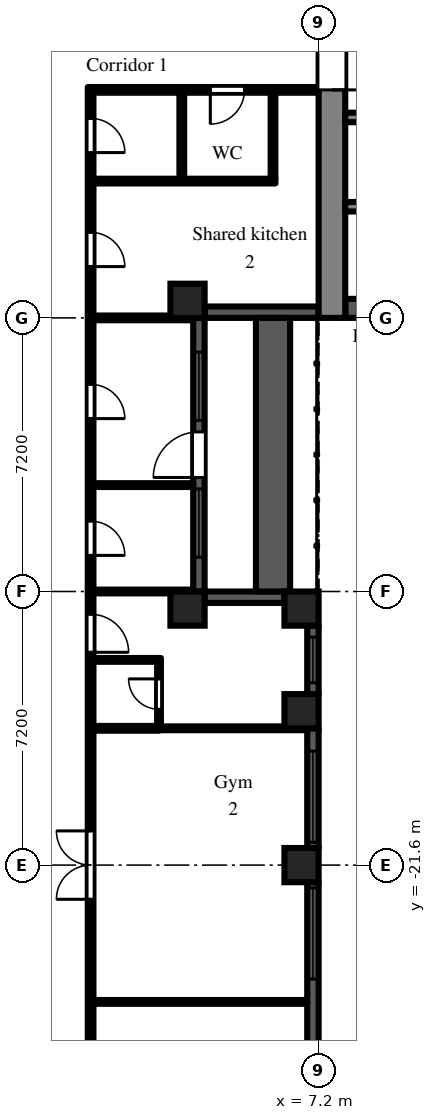
"""IFC4 building model, lengths in metres.
Left out: names, types, materials, properties, quantities, classifications, styles, units other than length and angle.
Written with IfcOpenShell. Run it as: python <this file> out.ifc"""

import sys

from ifc_helpers import new_model, si_unit, direction, frame, frame_2d, origin, origin_2d, place, context, subcontext, project, spatial, rectangle, extrude, element, fill, save


model = new_model("IFC4")
c1 = context("Model", 3, precision=1e-05, world=origin(), true_north=direction((0.0, 1.0)))
c2 = subcontext(c1, "Body", "Model", "MODEL_VIEW")
j1 = project(units=[si_unit("LENGTHUNIT", "METRE"), si_unit("PLANEANGLEUNIT", "RADIAN")], contexts=[c1])
p1 = place(None, origin())
s1 = spatial("IfcSite", under=j1, at=p1, CompositionType="ELEMENT")
p2 = place(p1, origin())
s2 = spatial("IfcBuilding", under=s1, at=p2, CompositionType="ELEMENT")
p3 = place(p2, frame((0.0, 0.0, 75.9)))
s3 = spatial("IfcBuildingStorey", under=s2, at=p3, CompositionType="ELEMENT", Elevation=75.9)
for number, where, z_axis, x_axis in (
    (1, (3.75, -14.85, 0.0), (0.0, 0.0, 1.0), (1.0, 0.0, 0.0)),
    (2, (3.75, -6.75, 0.0), (0.0, 0.0, 1.0), (1.0, 0.0, 0.0)),
    (3, (6.75, -21.6, 0.0), (0.0, 0.0, 1.0), (1.0, 0.0, 0.0)),
    (4, (6.75, -17.55, 0.0), (0.0, 0.0, 1.0), (1.0, 0.0, 0.0)),
    (5, (6.75, -14.85, 0.0), (0.0, 0.0, 1.0), (1.0, 0.0, 0.0)),
):
    element("IfcColumn", number, at=place(p3, frame(where, z_axis=z_axis, x_axis=x_axis)), inside=s3, PredefinedType="COLUMN", context=c2, shape_type="SweptSolid", body=[
        extrude(rectangle(XDim=0.9, YDim=0.9, at=origin_2d()), origin(), (0.0, 0.0, 1.0), 3.0),
    ])
p4 = place(p3, frame((7.05, -28.35, 0.0), z_axis=(0.0, 0.0, 1.0), x_axis=(0.0, 1.0, 0.0)))
e6 = element("IfcWall", 6, at=p4, inside=s3, PredefinedType="SOLIDWALL", context=c2, shape_type="SweptSolid", body=[
    extrude(rectangle(XDim=6.3, YDim=0.3, at=frame_2d((3.15, 0.0))), origin(), (0.0, 0.0, 1.0), 2.1),
])
p5 = place(p4, frame((3.75, 0.0, 0.2)))
e7 = element("IfcOpeningElement", 7, at=p5, cuts=e6, PredefinedType="OPENING", context=c2, shape_type="SweptSolid", body=[
    extrude(rectangle(XDim=2.4, YDim=1.85, at=frame_2d((1.2, 0.925))), frame((0.0, 0.16, 0.0), z_axis=(0.0, -1.0, 0.0), x_axis=(1.0, 0.0, 0.0)), (0.0, 0.0, 1.0), 0.32),
])
p6 = place(p3, frame((7.05, -21.15, 0.0), z_axis=(0.0, 0.0, 1.0), x_axis=(0.0, 1.0, 0.0)))
e8 = element("IfcWall", 8, at=p6, inside=s3, PredefinedType="SOLIDWALL", context=c2, shape_type="SweptSolid", body=[
    extrude(rectangle(XDim=3.15, YDim=0.3, at=frame_2d((1.575, 0.0))), origin(), (0.0, 0.0, 1.0), 2.1),
])
p7 = place(p6, frame((0.15, 0.0, 0.2)))
e9 = element("IfcOpeningElement", 9, at=p7, cuts=e8, PredefinedType="OPENING", context=c2, shape_type="SweptSolid", body=[
    extrude(rectangle(XDim=2.4, YDim=1.85, at=frame_2d((1.2, 0.925))), frame((0.0, 0.16, 0.0), z_axis=(0.0, -1.0, 0.0), x_axis=(1.0, 0.0, 0.0)), (0.0, 0.0, 1.0), 0.32),
])
p8 = place(p3, frame((7.05, -17.1, 0.0), z_axis=(0.0, 0.0, 1.0), x_axis=(0.0, 1.0, 0.0)))
e10 = element("IfcWall", 10, at=p8, inside=s3, PredefinedType="SOLIDWALL", context=c2, shape_type="SweptSolid", body=[
    extrude(rectangle(XDim=1.8, YDim=0.3, at=frame_2d((0.9, 0.0))), origin(), (0.0, 0.0, 1.0), 2.1),
])
p9 = place(p8, frame((0.3, 0.0, 0.2)))
e11 = element("IfcOpeningElement", 11, at=p9, cuts=e10, PredefinedType="OPENING", context=c2, shape_type="SweptSolid", body=[
    extrude(rectangle(XDim=1.2, YDim=1.85, at=frame_2d((0.6, 0.925))), frame((0.0, 0.16, 0.0), z_axis=(0.0, -1.0, 0.0), x_axis=(1.0, 0.0, 0.0)), (0.0, 0.0, 1.0), 0.32),
])
p10 = place(p3, frame((6.3, -14.55, 0.0), z_axis=(0.0, 0.0, 1.0), x_axis=(-1.0, 0.0, 0.0)))
e12 = element("IfcWall", 12, at=p10, inside=s3, PredefinedType="SOLIDWALL", context=c2, shape_type="SweptSolid", body=[
    extrude(rectangle(XDim=2.1, YDim=0.3, at=frame_2d((1.05, 0.0))), origin(), (0.0, 0.0, 1.0), 2.1),
])
p11 = place(p3, frame((4.05, -14.4, 0.0), z_axis=(0.0, 0.0, 1.0), x_axis=(0.0, 1.0, 0.0)))
e13 = element("IfcWall", 13, at=p11, inside=s3, PredefinedType="SOLIDWALL", context=c2, shape_type="SweptSolid", body=[
    extrude(rectangle(XDim=7.2, YDim=0.3, at=frame_2d((3.6, 0.0))), origin(), (0.0, 0.0, 1.0), 2.1),
])
p12 = place(p11, frame((3.0, 0.0, 0.0)))
e14 = element("IfcOpeningElement", 14, at=p12, cuts=e13, PredefinedType="OPENING", context=c2, shape_type="SweptSolid", body=[
    extrude(rectangle(XDim=1.2, YDim=2.05, at=frame_2d((0.6, 1.025))), frame((0.0, 0.16, 0.0), z_axis=(0.0, -1.0, 0.0), x_axis=(1.0, 0.0, 0.0)), (0.0, 0.0, 1.0), 0.32),
])
p13 = place(p11, frame((0.9, 0.0, 0.2)))
e15 = element("IfcOpeningElement", 15, at=p13, cuts=e13, PredefinedType="OPENING", context=c2, shape_type="SweptSolid", body=[
    extrude(rectangle(XDim=1.8, YDim=1.85, at=frame_2d((0.9, 0.925))), frame((0.0, 0.16, 0.0), z_axis=(0.0, -1.0, 0.0), x_axis=(1.0, 0.0, 0.0)), (0.0, 0.0, 1.0), 0.32),
])
p14 = place(p11, frame((4.5, 0.0, 0.2)))
e16 = element("IfcOpeningElement", 16, at=p14, cuts=e13, PredefinedType="OPENING", context=c2, shape_type="SweptSolid", body=[
    extrude(rectangle(XDim=1.8, YDim=1.85, at=frame_2d((0.9, 0.925))), frame((0.0, 0.16, 0.0), z_axis=(0.0, -1.0, 0.0), x_axis=(1.0, 0.0, 0.0)), (0.0, 0.0, 1.0), 0.32),
])
p15 = place(p3, frame((4.2, -7.05, 0.0), z_axis=(0.0, 0.0, 1.0), x_axis=(1.0, 0.0, 0.0)))
e17 = element("IfcWall", 17, at=p15, inside=s3, PredefinedType="SOLIDWALL", context=c2, shape_type="SweptSolid", body=[
    extrude(rectangle(XDim=3.0, YDim=0.3, at=frame_2d((1.5, 0.0))), origin(), (0.0, 0.0, 1.0), 2.1),
])
p16 = place(p3, frame((6.0, -14.4, 0.0), z_axis=(0.0, 0.0, 1.0), x_axis=(0.0, 1.0, 0.0)))
e18 = element("IfcWall", 18, at=p16, inside=s3, PredefinedType="PARAPET", context=c2, shape_type="SweptSolid", body=[
    extrude(rectangle(XDim=7.2, YDim=0.9, at=frame_2d((3.6, 0.0))), origin(), (0.0, 0.0, 1.0), 0.8),
])
p17 = place(p3, frame((7.55, -7.2, 0.0), z_axis=(0.0, 0.0, 1.0), x_axis=(0.0, 1.0, 0.0)))
e19 = element("IfcWall", 19, at=p17, inside=s3, PredefinedType="SHEAR", context=c2, shape_type="SweptSolid", body=[
    extrude(rectangle(XDim=14.4, YDim=0.7, at=frame_2d((7.2, 0.0))), origin(), (0.0, 0.0, 1.0), 2.575),
])
p18 = place(p17, frame((6.0, 0.0, 0.0)))
e20 = element("IfcOpeningElement", 20, at=p18, cuts=e19, PredefinedType="OPENING", context=c2, shape_type="SweptSolid", body=[
    extrude(rectangle(XDim=2.4, YDim=2.2, at=frame_2d((1.2, 1.1))), frame((0.0, 0.36, 0.0), z_axis=(0.0, -1.0, 0.0), x_axis=(1.0, 0.0, 0.0)), (0.0, 0.0, 1.0), 0.72),
])
p19 = place(p3, frame((7.9, -6.95, 0.0), z_axis=(0.0, 0.0, 1.0), x_axis=(1.0, 0.0, 0.0)))
e21 = element("IfcWall", 21, at=p19, inside=s3, PredefinedType="SHEAR", context=c2, shape_type="SweptSolid", body=[
    extrude(rectangle(XDim=12.95, YDim=0.5, at=frame_2d((6.475, 0.0))), origin(), (0.0, 0.0, 1.0), 2.575),
])
p20 = place(p3, frame((7.9, -1.925, 0.0), z_axis=(0.0, 0.0, 1.0), x_axis=(1.0, 0.0, 0.0)))
e22 = element("IfcWall", 22, at=p20, inside=s3, PredefinedType="SHEAR", context=c2, shape_type="SweptSolid", body=[
    extrude(rectangle(XDim=12.95, YDim=0.25, at=frame_2d((6.475, 0.0))), origin(), (0.0, 0.0, 1.0), 2.575),
])
p21 = place(p20, frame((4.825, 0.0, 0.0)))
e23 = element("IfcOpeningElement", 23, at=p21, cuts=e22, PredefinedType="OPENING", context=c2, shape_type="SweptSolid", body=[
    extrude(rectangle(XDim=1.1, YDim=2.1, at=frame_2d((0.55, 1.05))), frame((0.0, 0.135, 0.0), z_axis=(0.0, -1.0, 0.0), x_axis=(1.0, 0.0, 0.0)), (0.0, 0.0, 1.0), 0.27),
])
p22 = place(p20, frame((7.025, 0.0, 0.0)))
e24 = element("IfcOpeningElement", 24, at=p22, cuts=e22, PredefinedType="OPENING", context=c2, shape_type="SweptSolid", body=[
    extrude(rectangle(XDim=1.1, YDim=2.1, at=frame_2d((0.55, 1.05))), frame((0.0, 0.135, 0.0), z_axis=(0.0, -1.0, 0.0), x_axis=(1.0, 0.0, 0.0)), (0.0, 0.0, 1.0), 0.27),
])
p23 = place(p20, frame((9.225, 0.0, 0.0)))
e25 = element("IfcOpeningElement", 25, at=p23, cuts=e22, PredefinedType="OPENING", context=c2, shape_type="SweptSolid", body=[
    extrude(rectangle(XDim=1.1, YDim=2.1, at=frame_2d((0.55, 1.05))), frame((0.0, 0.135, 0.0), z_axis=(0.0, -1.0, 0.0), x_axis=(1.0, 0.0, 0.0)), (0.0, 0.0, 1.0), 0.27),
])
p24 = place(p20, frame((0.525, 0.0, 0.0)))
e26 = element("IfcOpeningElement", 26, at=p24, cuts=e22, PredefinedType="OPENING", context=c2, shape_type="SweptSolid", body=[
    extrude(rectangle(XDim=0.9, YDim=2.1, at=frame_2d((0.45, 1.05))), frame((0.0, 0.135, 0.0), z_axis=(0.0, -1.0, 0.0), x_axis=(1.0, 0.0, 0.0)), (0.0, 0.0, 1.0), 0.27),
])
p25 = place(p20, frame((2.625, 0.0, 0.0)))
e27 = element("IfcOpeningElement", 27, at=p25, cuts=e22, PredefinedType="OPENING", context=c2, shape_type="SweptSolid", body=[
    extrude(rectangle(XDim=1.1, YDim=2.1, at=frame_2d((0.55, 1.05))), frame((0.0, 0.135, 0.0), z_axis=(0.0, -1.0, 0.0), x_axis=(1.0, 0.0, 0.0)), (0.0, 0.0, 1.0), 0.27),
])
p26 = place(p3, frame((7.9, -4.275, 0.0), z_axis=(0.0, 0.0, 1.0), x_axis=(1.0, 0.0, 0.0)))
e28 = element("IfcWall", 28, at=p26, inside=s3, PredefinedType="SHEAR", context=c2, shape_type="SweptSolid", body=[
    extrude(rectangle(XDim=1.95, YDim=0.25, at=frame_2d((0.975, 0.0))), origin(), (0.0, 0.0, 1.0), 2.575),
])
p27 = place(p3, frame((1.2, -36.5, 0.0), z_axis=(0.0, 0.0, 1.0), x_axis=(0.0, 1.0, 0.0)))
e29 = element("IfcWall", 29, at=p27, inside=s3, PredefinedType="PARTITIONING", context=c2, shape_type="SweptSolid", body=[
    extrude(rectangle(XDim=35.375, YDim=0.15, at=frame_2d((17.688, 0.0))), origin(), (0.0, 0.0, 1.0), 2.575),
])
p28 = place(p27, frame((33.65, 0.0, 0.0)))
e30 = element("IfcOpeningElement", 30, at=p28, cuts=e29, PredefinedType="OPENING", context=c2, shape_type="SweptSolid", body=[
    extrude(rectangle(XDim=0.9, YDim=2.1, at=frame_2d((0.45, 1.05))), frame((0.0, 0.085, 0.0), z_axis=(0.0, -1.0, 0.0), x_axis=(1.0, 0.0, 0.0)), (0.0, 0.0, 1.0), 0.17),
])
p29 = place(p27, frame((30.65, 0.0, 0.0)))
e31 = element("IfcOpeningElement", 31, at=p29, cuts=e29, PredefinedType="OPENING", context=c2, shape_type="SweptSolid", body=[
    extrude(rectangle(XDim=0.9, YDim=2.1, at=frame_2d((0.45, 1.05))), frame((0.0, 0.085, 0.0), z_axis=(0.0, -1.0, 0.0), x_axis=(1.0, 0.0, 0.0)), (0.0, 0.0, 1.0), 0.17),
])
p30 = place(p27, frame((23.05, 0.0, 0.0)))
e32 = element("IfcOpeningElement", 32, at=p30, cuts=e29, PredefinedType="OPENING", context=c2, shape_type="SweptSolid", body=[
    extrude(rectangle(XDim=0.9, YDim=2.1, at=frame_2d((0.45, 1.05))), frame((0.0, 0.085, 0.0), z_axis=(0.0, -1.0, 0.0), x_axis=(1.0, 0.0, 0.0)), (0.0, 0.0, 1.0), 0.17),
])
p31 = place(p27, frame((26.65, 0.0, 0.0)))
e33 = element("IfcOpeningElement", 33, at=p31, cuts=e29, PredefinedType="OPENING", context=c2, shape_type="SweptSolid", body=[
    extrude(rectangle(XDim=0.9, YDim=2.1, at=frame_2d((0.45, 1.05))), frame((0.0, 0.085, 0.0), z_axis=(0.0, -1.0, 0.0), x_axis=(1.0, 0.0, 0.0)), (0.0, 0.0, 1.0), 0.17),
])
p32 = place(p27, frame((20.5, 0.0, 0.0)))
e34 = element("IfcOpeningElement", 34, at=p32, cuts=e29, PredefinedType="OPENING", context=c2, shape_type="SweptSolid", body=[
    extrude(rectangle(XDim=1.0, YDim=2.1, at=frame_2d((0.5, 1.05))), frame((0.0, 0.085, 0.0), z_axis=(0.0, -1.0, 0.0), x_axis=(1.0, 0.0, 0.0)), (0.0, 0.0, 1.0), 0.17),
])
p33 = place(p27, frame((14.0, 0.0, 0.0)))
e35 = element("IfcOpeningElement", 35, at=p33, cuts=e29, PredefinedType="OPENING", context=c2, shape_type="SweptSolid", body=[
    extrude(rectangle(XDim=1.8, YDim=2.1, at=frame_2d((0.9, 1.05))), frame((0.0, 0.085, 0.0), z_axis=(0.0, -1.0, 0.0), x_axis=(1.0, 0.0, 0.0)), (0.0, 0.0, 1.0), 0.17),
])
p34 = place(p27, frame((6.8, 0.0, 0.0)))
e36 = element("IfcOpeningElement", 36, at=p34, cuts=e29, PredefinedType="OPENING", context=c2, shape_type="SweptSolid", body=[
    extrude(rectangle(XDim=1.8, YDim=2.1, at=frame_2d((0.9, 1.05))), frame((0.0, 0.085, 0.0), z_axis=(0.0, -1.0, 0.0), x_axis=(1.0, 0.0, 0.0)), (0.0, 0.0, 1.0), 0.17),
])
p35 = place(p27, frame((1.15, 0.0, 0.0)))
e37 = element("IfcOpeningElement", 37, at=p35, cuts=e29, PredefinedType="OPENING", context=c2, shape_type="SweptSolid", body=[
    extrude(rectangle(XDim=1.8, YDim=2.1, at=frame_2d((0.9, 1.05))), frame((0.0, 0.085, 0.0), z_axis=(0.0, -1.0, 0.0), x_axis=(1.0, 0.0, 0.0)), (0.0, 0.0, 1.0), 0.17),
])
p36 = place(p3, frame((1.275, -25.2, 0.0), z_axis=(0.0, 0.0, 1.0), x_axis=(1.0, 0.0, 0.0)))
e38 = element("IfcWall", 38, at=p36, inside=s3, PredefinedType="PARTITIONING", context=c2, shape_type="SweptSolid", body=[
    extrude(rectangle(XDim=5.625, YDim=0.1, at=frame_2d((2.812, 0.0))), origin(), (0.0, 0.0, 1.0), 2.575),
])
p37 = place(p3, frame((1.275, -18.0, 0.0), z_axis=(0.0, 0.0, 1.0), x_axis=(1.0, 0.0, 0.0)))
e39 = element("IfcWall", 39, at=p37, inside=s3, PredefinedType="PARTITIONING", context=c2, shape_type="SweptSolid", body=[
    extrude(rectangle(XDim=1.725, YDim=0.125, at=frame_2d((0.863, 0.0))), origin(), (0.0, 0.0, 1.0), 2.575),
])
p38 = place(p3, frame((1.275, -16.2, 0.0), z_axis=(0.0, 0.0, 1.0), x_axis=(1.0, 0.0, 0.0)))
e40 = element("IfcWall", 40, at=p38, inside=s3, PredefinedType="PARTITIONING", context=c2, shape_type="SweptSolid", body=[
    extrude(rectangle(XDim=1.775, YDim=0.1, at=frame_2d((0.888, 0.0))), origin(), (0.0, 0.0, 1.0), 2.575),
])
for number, where, z_axis, x_axis in (
    (41, (1.275, -14.4, 0.0), (0.0, 0.0, 1.0), (1.0, 0.0, 0.0)),
    (42, (1.275, -11.6, 0.0), (0.0, 0.0, 1.0), (1.0, 0.0, 0.0)),
):
    element("IfcWall", number, at=place(p3, frame(where, z_axis=z_axis, x_axis=x_axis)), inside=s3, PredefinedType="PARTITIONING", context=c2, shape_type="SweptSolid", body=[
        extrude(rectangle(XDim=2.625, YDim=0.1, at=frame_2d((1.312, 0.0))), origin(), (0.0, 0.0, 1.0), 2.575),
    ])
p39 = place(p3, frame((1.275, -7.2, 0.0), z_axis=(0.0, 0.0, 1.0), x_axis=(1.0, 0.0, 0.0)))
e43 = element("IfcWall", 43, at=p39, inside=s3, PredefinedType="PARTITIONING", context=c2, shape_type="SweptSolid", body=[
    extrude(rectangle(XDim=2.625, YDim=0.125, at=frame_2d((1.312, 0.0))), origin(), (0.0, 0.0, 1.0), 2.575),
])
p40 = place(p3, frame((1.275, -3.6, 0.0), z_axis=(0.0, 0.0, 1.0), x_axis=(1.0, 0.0, 0.0)))
e44 = element("IfcWall", 44, at=p40, inside=s3, PredefinedType="PARTITIONING", context=c2, shape_type="SweptSolid", body=[
    extrude(rectangle(XDim=4.788, YDim=0.125, at=frame_2d((2.394, 0.0))), origin(), (0.0, 0.0, 1.0), 2.575),
])
p41 = place(p3, frame((1.275, -1.2, 0.0), z_axis=(0.0, 0.0, 1.0), x_axis=(1.0, 0.0, 0.0)))
e45 = element("IfcWall", 45, at=p41, inside=s3, PredefinedType="PARTITIONING", context=c2, shape_type="SweptSolid", body=[
    extrude(rectangle(XDim=5.925, YDim=0.15, at=frame_2d((2.962, 0.0))), origin(), (0.0, 0.0, 1.0), 2.575),
])
p42 = place(p41, frame((3.075, 0.0, 0.0)))
e46 = element("IfcOpeningElement", 46, at=p42, cuts=e45, PredefinedType="OPENING", context=c2, shape_type="SweptSolid", body=[
    extrude(rectangle(XDim=0.9, YDim=2.1, at=frame_2d((0.45, 1.05))), frame((0.0, 0.085, 0.0), z_axis=(0.0, -1.0, 0.0), x_axis=(1.0, 0.0, 0.0)), (0.0, 0.0, 1.0), 0.17),
])
p43 = place(p3, frame((3.0, -17.938, 0.0), z_axis=(0.0, 0.0, 1.0), x_axis=(0.0, 1.0, 0.0)))
e47 = element("IfcWall", 47, at=p43, inside=s3, PredefinedType="PARTITIONING", context=c2, shape_type="SweptSolid", body=[
    extrude(rectangle(XDim=1.688, YDim=0.1, at=frame_2d((0.844, 0.0))), origin(), (0.0, 0.0, 1.0), 2.575),
])
p44 = place(p43, frame((0.438, 0.0, 0.0)))
e48 = element("IfcOpeningElement", 48, at=p44, cuts=e47, PredefinedType="OPENING", context=c2, shape_type="SweptSolid", body=[
    extrude(rectangle(XDim=0.8, YDim=2.1, at=frame_2d((0.4, 1.05))), frame((0.0, 0.06, 0.0), z_axis=(0.0, -1.0, 0.0), x_axis=(1.0, 0.0, 0.0)), (0.0, 0.0, 1.0), 0.12),
])
p45 = place(p3, frame((3.0, -18.0, 0.0), z_axis=(0.0, 0.0, 1.0), x_axis=(1.0, 0.0, 0.0)))
e49 = element("IfcWall", 49, at=p45, inside=s3, PredefinedType="PARTITIONING", context=c2, shape_type="SweptSolid", body=[
    extrude(rectangle(XDim=3.9, YDim=0.1, at=frame_2d((1.95, 0.0))), origin(), (0.0, 0.0, 1.0), 2.575),
])
for number, where, z_axis, x_axis in (
    (50, (3.6, -3.538, 0.0), (0.0, 0.0, 1.0), (0.0, 1.0, 0.0)),
    (51, (6.0, -3.538, 0.0), (0.0, 0.0, 1.0), (0.0, 1.0, 0.0)),
):
    element("IfcWall", number, at=place(p3, frame(where, z_axis=z_axis, x_axis=x_axis)), inside=s3, PredefinedType="PARTITIONING", context=c2, shape_type="SweptSolid", body=[
        extrude(rectangle(XDim=2.263, YDim=0.125, at=frame_2d((1.131, 0.0))), origin(), (0.0, 0.0, 1.0), 2.575),
    ])
p46 = place(p5, origin())
e52 = element("IfcWindow", 52, at=p46, inside=s3, PartitioningType="SINGLE_PANEL", PredefinedType="WINDOW", context=c2, shape_type="SweptSolid", body=[
    extrude(rectangle(XDim=2.4, YDim=1.85, at=frame_2d((1.2, 0.925))), frame((0.0, 0.03, 0.0), z_axis=(0.0, -1.0, 0.0), x_axis=(1.0, 0.0, 0.0)), (0.0, 0.0, 1.0), 0.06),
])
fill(e7, e52)
p47 = place(p7, origin())
e53 = element("IfcWindow", 53, at=p47, inside=s3, PartitioningType="SINGLE_PANEL", PredefinedType="WINDOW", context=c2, shape_type="SweptSolid", body=[
    extrude(rectangle(XDim=2.4, YDim=1.85, at=frame_2d((1.2, 0.925))), frame((0.0, 0.03, 0.0), z_axis=(0.0, -1.0, 0.0), x_axis=(1.0, 0.0, 0.0)), (0.0, 0.0, 1.0), 0.06),
])
fill(e9, e53)
p48 = place(p9, origin())
e54 = element("IfcWindow", 54, at=p48, inside=s3, PartitioningType="SINGLE_PANEL", PredefinedType="WINDOW", context=c2, shape_type="SweptSolid", body=[
    extrude(rectangle(XDim=1.2, YDim=1.85, at=frame_2d((0.6, 0.925))), frame((0.0, 0.03, 0.0), z_axis=(0.0, -1.0, 0.0), x_axis=(1.0, 0.0, 0.0)), (0.0, 0.0, 1.0), 0.06),
])
fill(e11, e54)
p49 = place(p12, origin())
e55 = element("IfcDoor", 55, at=p49, inside=s3, OperationType="SINGLE_SWING_LEFT", PredefinedType="DOOR", context=c2, shape_type="SweptSolid", body=[
    extrude(rectangle(XDim=1.2, YDim=2.05, at=frame_2d((0.6, 1.025))), frame((0.0, 0.025, 0.0), z_axis=(0.0, -1.0, 0.0), x_axis=(1.0, 0.0, 0.0)), (0.0, 0.0, 1.0), 0.05),
])
fill(e14, e55)
p50 = place(p13, origin())
e56 = element("IfcWindow", 56, at=p50, inside=s3, PartitioningType="SINGLE_PANEL", PredefinedType="WINDOW", context=c2, shape_type="SweptSolid", body=[
    extrude(rectangle(XDim=1.8, YDim=1.85, at=frame_2d((0.9, 0.925))), frame((0.0, 0.03, 0.0), z_axis=(0.0, -1.0, 0.0), x_axis=(1.0, 0.0, 0.0)), (0.0, 0.0, 1.0), 0.06),
])
fill(e15, e56)
p51 = place(p14, origin())
e57 = element("IfcWindow", 57, at=p51, inside=s3, PartitioningType="SINGLE_PANEL", PredefinedType="WINDOW", context=c2, shape_type="SweptSolid", body=[
    extrude(rectangle(XDim=1.8, YDim=1.85, at=frame_2d((0.9, 0.925))), frame((0.0, 0.03, 0.0), z_axis=(0.0, -1.0, 0.0), x_axis=(1.0, 0.0, 0.0)), (0.0, 0.0, 1.0), 0.06),
])
fill(e16, e57)
p52 = place(p18, frame((2.4, 0.0, 0.0), z_axis=(0.0, 0.0, 1.0), x_axis=(-1.0, 0.0, 0.0)))
e58 = element("IfcDoor", 58, at=p52, inside=s3, OperationType="DOUBLE_DOOR_DOUBLE_SWING", PredefinedType="DOOR", context=c2, shape_type="SweptSolid", body=[
    extrude(rectangle(XDim=2.4, YDim=2.2, at=frame_2d((1.2, 1.1))), frame((0.0, 0.025, 0.0), z_axis=(0.0, -1.0, 0.0), x_axis=(1.0, 0.0, 0.0)), (0.0, 0.0, 1.0), 0.05),
])
fill(e20, e58)
p53 = place(p28, frame((0.9, 0.0, 0.0), z_axis=(0.0, 0.0, 1.0), x_axis=(-1.0, 0.0, 0.0)))
e59 = element("IfcDoor", 59, at=p53, inside=s3, OperationType="SINGLE_SWING_RIGHT", PredefinedType="DOOR", context=c2, shape_type="SweptSolid", body=[
    extrude(rectangle(XDim=0.9, YDim=2.1, at=frame_2d((0.45, 1.05))), frame((0.0, 0.025, 0.0), z_axis=(0.0, -1.0, 0.0), x_axis=(1.0, 0.0, 0.0)), (0.0, 0.0, 1.0), 0.05),
])
fill(e30, e59)
p54 = place(p42, frame((0.9, 0.0, 0.0), z_axis=(0.0, 0.0, 1.0), x_axis=(-1.0, 0.0, 0.0)))
e60 = element("IfcDoor", 60, at=p54, inside=s3, OperationType="SINGLE_SWING_RIGHT", PredefinedType="DOOR", context=c2, shape_type="SweptSolid", body=[
    extrude(rectangle(XDim=0.9, YDim=2.1, at=frame_2d((0.45, 1.05))), frame((0.0, 0.025, 0.0), z_axis=(0.0, -1.0, 0.0), x_axis=(1.0, 0.0, 0.0)), (0.0, 0.0, 1.0), 0.05),
])
fill(e46, e60)
p55 = place(p29, frame((0.9, 0.0, 0.0), z_axis=(0.0, 0.0, 1.0), x_axis=(-1.0, 0.0, 0.0)))
e61 = element("IfcDoor", 61, at=p55, inside=s3, OperationType="SINGLE_SWING_RIGHT", PredefinedType="DOOR", context=c2, shape_type="SweptSolid", body=[
    extrude(rectangle(XDim=0.9, YDim=2.1, at=frame_2d((0.45, 1.05))), frame((0.0, 0.025, 0.0), z_axis=(0.0, -1.0, 0.0), x_axis=(1.0, 0.0, 0.0)), (0.0, 0.0, 1.0), 0.05),
])
fill(e31, e61)
p56 = place(p30, frame((0.9, 0.0, 0.0), z_axis=(0.0, 0.0, 1.0), x_axis=(-1.0, 0.0, 0.0)))
e62 = element("IfcDoor", 62, at=p56, inside=s3, OperationType="SINGLE_SWING_RIGHT", PredefinedType="DOOR", context=c2, shape_type="SweptSolid", body=[
    extrude(rectangle(XDim=0.9, YDim=2.1, at=frame_2d((0.45, 1.05))), frame((0.0, 0.025, 0.0), z_axis=(0.0, -1.0, 0.0), x_axis=(1.0, 0.0, 0.0)), (0.0, 0.0, 1.0), 0.05),
])
fill(e32, e62)
p57 = place(p31, frame((0.9, 0.0, 0.0), z_axis=(0.0, 0.0, 1.0), x_axis=(-1.0, 0.0, 0.0)))
e63 = element("IfcDoor", 63, at=p57, inside=s3, OperationType="SINGLE_SWING_RIGHT", PredefinedType="DOOR", context=c2, shape_type="SweptSolid", body=[
    extrude(rectangle(XDim=0.9, YDim=2.1, at=frame_2d((0.45, 1.05))), frame((0.0, 0.025, 0.0), z_axis=(0.0, -1.0, 0.0), x_axis=(1.0, 0.0, 0.0)), (0.0, 0.0, 1.0), 0.05),
])
fill(e33, e63)
p58 = place(p44, origin())
e64 = element("IfcDoor", 64, at=p58, inside=s3, OperationType="SINGLE_SWING_RIGHT", PredefinedType="DOOR", context=c2, shape_type="SweptSolid", body=[
    extrude(rectangle(XDim=0.8, YDim=2.1, at=frame_2d((0.4, 1.05))), frame((0.0, 0.025, 0.0), z_axis=(0.0, -1.0, 0.0), x_axis=(1.0, 0.0, 0.0)), (0.0, 0.0, 1.0), 0.05),
])
fill(e48, e64)
p59 = place(p32, frame((1.0, 0.0, 0.0), z_axis=(0.0, 0.0, 1.0), x_axis=(-1.0, 0.0, 0.0)))
e65 = element("IfcDoor", 65, at=p59, inside=s3, OperationType="SINGLE_SWING_RIGHT", PredefinedType="DOOR", context=c2, shape_type="SweptSolid", body=[
    extrude(rectangle(XDim=1.0, YDim=2.1, at=frame_2d((0.5, 1.05))), frame((0.0, 0.025, 0.0), z_axis=(0.0, -1.0, 0.0), x_axis=(1.0, 0.0, 0.0)), (0.0, 0.0, 1.0), 0.05),
])
fill(e34, e65)
p60 = place(p33, origin())
e66 = element("IfcDoor", 66, at=p60, inside=s3, OperationType="DOUBLE_DOOR_DOUBLE_SWING", PredefinedType="DOOR", context=c2, shape_type="SweptSolid", body=[
    extrude(rectangle(XDim=1.8, YDim=2.1, at=frame_2d((0.9, 1.05))), frame((0.0, 0.025, 0.0), z_axis=(0.0, -1.0, 0.0), x_axis=(1.0, 0.0, 0.0)), (0.0, 0.0, 1.0), 0.05),
])
fill(e35, e66)
save(model, sys.argv[1])
